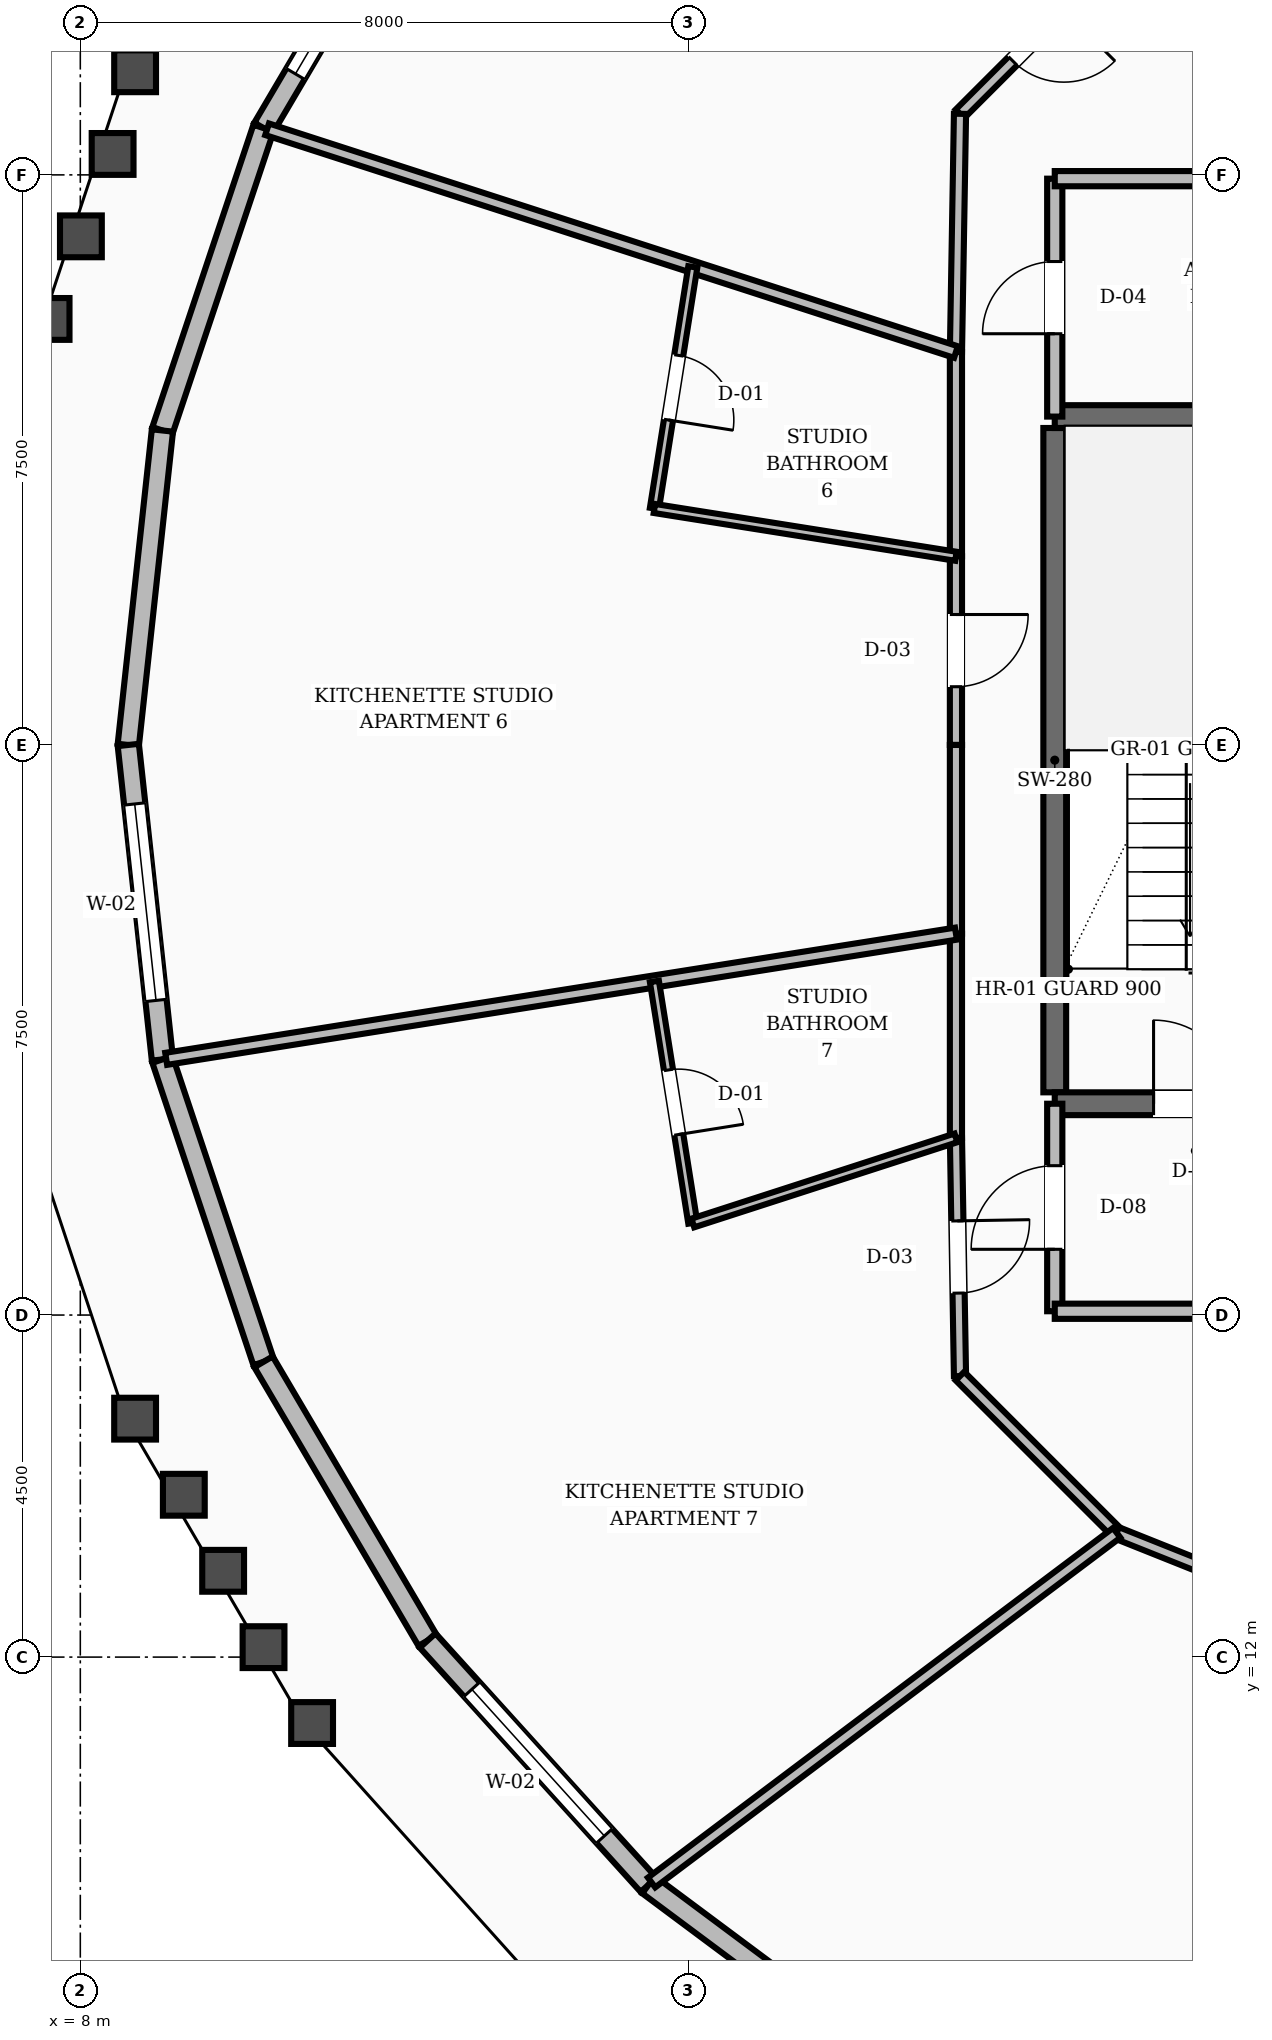
"""IFC4 building model, lengths in metres.
Left out: names, types, materials, properties, quantities, classifications, styles, units other than length and angle.
Written with IfcOpenShell. Run it as: python <this file> out.ifc"""

import sys

from ifc_helpers import new_model, si_unit, direction, frame, frame_2d, origin, place, context, subcontext, project, spatial, rectangle, extrude, element, fill, save


model = new_model("IFC4")
c1 = context("Model", 3, precision=1e-05, world=origin(), true_north=direction((0.0, 1.0)))
c2 = subcontext(c1, "Body", "Model", "MODEL_VIEW")
j1 = project(units=[si_unit("LENGTHUNIT", "METRE"), si_unit("PLANEANGLEUNIT", "RADIAN")], contexts=[c1])
p1 = place(None, origin())
s1 = spatial("IfcSite", under=j1, at=p1, CompositionType="ELEMENT")
p2 = place(p1, origin())
s2 = spatial("IfcBuilding", under=s1, at=p2, CompositionType="ELEMENT")
p3 = place(p2, frame((0.0, 0.0, 218.4)))
s3 = spatial("IfcBuildingStorey", under=s2, at=p3, CompositionType="ELEMENT", Elevation=218.4)
p4 = place(p3, frame((20.82, 19.43, 0.0), z_axis=(0.0, 0.0, 1.0), x_axis=(0.0, 1.0, 0.0)))
e1 = element("IfcWall", 1, at=p4, inside=s3, PredefinedType="SHEAR", context=c2, shape_type="SweptSolid", body=[
    extrude(rectangle(XDim=8.74, YDim=0.3, at=frame_2d((4.37, 0.0))), origin(), (0.0, 0.0, 1.0), 3.6),
])
p5 = place(p3, frame((20.82, 19.28, 0.0), z_axis=(0.0, 0.0, 1.0), x_axis=(1.0, 0.0, 0.0)))
e2 = element("IfcWall", 2, at=p5, inside=s3, PredefinedType="SHEAR", context=c2, shape_type="SweptSolid", body=[
    extrude(rectangle(XDim=3.6, YDim=0.3, at=frame_2d((1.8, 0.0))), origin(), (0.0, 0.0, 1.0), 3.6),
])
p6 = place(p5, frame((1.3, 0.0, 0.0)))
e3 = element("IfcOpeningElement", 3, at=p6, cuts=e2, PredefinedType="OPENING", context=c2, shape_type="SweptSolid", body=[
    extrude(rectangle(XDim=1.1, YDim=2.1, at=frame_2d((0.55, 1.05))), frame((0.0, 0.16, 0.0), z_axis=(0.0, -1.0, 0.0), x_axis=(1.0, 0.0, 0.0)), (0.0, 0.0, 1.0), 0.32),
])
p7 = place(p3, frame((20.82, 28.32, 0.0), z_axis=(0.0, 0.0, 1.0), x_axis=(1.0, 0.0, 0.0)))
e4 = element("IfcWall", 4, at=p7, inside=s3, PredefinedType="SHEAR", context=c2, shape_type="SweptSolid", body=[
    extrude(rectangle(XDim=3.6, YDim=0.3, at=frame_2d((1.8, 0.0))), origin(), (0.0, 0.0, 1.0), 3.6),
])
p8 = place(p3, frame((12.57, 35.782, 0.0), z_axis=(0.0, 0.0, 1.0), x_axis=(-0.50750901232, -0.861646448617, 0.0)))
e5 = element("IfcWall", 5, at=p8, inside=s3, PredefinedType="STANDARD", context=c2, shape_type="SweptSolid", body=[
    extrude(rectangle(XDim=4.255, YDim=0.28, at=frame_2d((2.127, 0.0))), origin(), (0.0, 0.0, 1.0), 2.88),
])
p9 = place(p8, frame((0.827, 0.0, 0.8)))
e6 = element("IfcOpeningElement", 6, at=p9, cuts=e5, PredefinedType="OPENING", context=c2, shape_type="SweptSolid", body=[
    extrude(rectangle(XDim=2.6, YDim=1.65, at=frame_2d((1.3, 0.825))), frame((0.0, 0.15, 0.0), z_axis=(0.0, -1.0, 0.0), x_axis=(1.0, 0.0, 0.0)), (0.0, 0.0, 1.0), 0.3),
])
p10 = place(p3, frame((10.41, 32.115, 0.0), z_axis=(0.0, 0.0, 1.0), x_axis=(-0.317030851827, -0.948415224989, 0.0)))
e7 = element("IfcWall", 7, at=p10, inside=s3, PredefinedType="STANDARD", context=c2, shape_type="SweptSolid", body=[
    extrude(rectangle(XDim=4.195, YDim=0.28, at=frame_2d((2.097, 0.0))), origin(), (0.0, 0.0, 1.0), 2.88),
])
p11 = place(p3, frame((9.08, 28.137, 0.0), z_axis=(0.0, 0.0, 1.0), x_axis=(-0.107887755605, -0.994163081285, 0.0)))
e8 = element("IfcWall", 8, at=p11, inside=s3, PredefinedType="STANDARD", context=c2, shape_type="SweptSolid", body=[
    extrude(rectangle(XDim=4.161, YDim=0.28, at=frame_2d((2.081, 0.0))), origin(), (0.0, 0.0, 1.0), 2.88),
])
p12 = place(p3, frame((8.631, 24.0, 0.0), z_axis=(0.0, 0.0, 1.0), x_axis=(0.107887755605, -0.994163081285, 0.0)))
e9 = element("IfcWall", 9, at=p12, inside=s3, PredefinedType="STANDARD", context=c2, shape_type="SweptSolid", body=[
    extrude(rectangle(XDim=4.161, YDim=0.28, at=frame_2d((2.081, 0.0))), origin(), (0.0, 0.0, 1.0), 2.88),
])
p13 = place(p12, frame((0.781, 0.0, 0.8)))
e10 = element("IfcOpeningElement", 10, at=p13, cuts=e9, PredefinedType="OPENING", context=c2, shape_type="SweptSolid", body=[
    extrude(rectangle(XDim=2.6, YDim=1.65, at=frame_2d((1.3, 0.825))), frame((0.0, 0.15, 0.0), z_axis=(0.0, -1.0, 0.0), x_axis=(1.0, 0.0, 0.0)), (0.0, 0.0, 1.0), 0.3),
])
p14 = place(p3, frame((9.08, 19.863, 0.0), z_axis=(0.0, 0.0, 1.0), x_axis=(0.317030851827, -0.948415224989, 0.0)))
e11 = element("IfcWall", 11, at=p14, inside=s3, PredefinedType="STANDARD", context=c2, shape_type="SweptSolid", body=[
    extrude(rectangle(XDim=4.195, YDim=0.28, at=frame_2d((2.097, 0.0))), origin(), (0.0, 0.0, 1.0), 2.88),
])
p15 = place(p3, frame((10.41, 15.885, 0.0), z_axis=(0.0, 0.0, 1.0), x_axis=(0.50750901232, -0.861646448617, 0.0)))
e12 = element("IfcWall", 12, at=p15, inside=s3, PredefinedType="STANDARD", context=c2, shape_type="SweptSolid", body=[
    extrude(rectangle(XDim=4.255, YDim=0.28, at=frame_2d((2.127, 0.0))), origin(), (0.0, 0.0, 1.0), 2.88),
])
p16 = place(p3, frame((12.57, 12.218, 0.0), z_axis=(0.0, 0.0, 1.0), x_axis=(0.670746586543, -0.741686602711, 0.0)))
e13 = element("IfcWall", 13, at=p16, inside=s3, PredefinedType="STANDARD", context=c2, shape_type="SweptSolid", body=[
    extrude(rectangle(XDim=4.333, YDim=0.28, at=frame_2d((2.167, 0.0))), origin(), (0.0, 0.0, 1.0), 2.88),
])
p17 = place(p16, frame((0.866, 0.0, 0.8)))
e14 = element("IfcOpeningElement", 14, at=p17, cuts=e13, PredefinedType="OPENING", context=c2, shape_type="SweptSolid", body=[
    extrude(rectangle(XDim=2.6, YDim=1.65, at=frame_2d((1.3, 0.825))), frame((0.0, 0.15, 0.0), z_axis=(0.0, -1.0, 0.0), x_axis=(1.0, 0.0, 0.0)), (0.0, 0.0, 1.0), 0.3),
])
p18 = place(p3, frame((15.476, 9.005, 0.0), z_axis=(0.0, 0.0, 1.0), x_axis=(0.802005914902, -0.597316090912, 0.0)))
e15 = element("IfcWall", 15, at=p18, inside=s3, PredefinedType="STANDARD", context=c2, shape_type="SweptSolid", body=[
    extrude(rectangle(XDim=4.416, YDim=0.28, at=frame_2d((2.208, 0.0))), origin(), (0.0, 0.0, 1.0), 2.88),
])
p19 = place(p3, frame((20.82, 16.55, 0.0), z_axis=(0.0, 0.0, 1.0), x_axis=(0.0, 1.0, 0.0)))
e16 = element("IfcWall", 16, at=p19, inside=s3, PredefinedType="SOLIDWALL", context=c2, shape_type="SweptSolid", body=[
    extrude(rectangle(XDim=2.73, YDim=0.2, at=frame_2d((1.365, 0.0))), origin(), (0.0, 0.0, 1.0), 2.87),
])
p20 = place(p19, frame((0.815, 0.0, 0.0)))
e17 = element("IfcOpeningElement", 17, at=p20, cuts=e16, PredefinedType="OPENING", context=c2, shape_type="SweptSolid", body=[
    extrude(rectangle(XDim=1.1, YDim=2.1, at=frame_2d((0.55, 1.05))), frame((0.0, 0.11, 0.0), z_axis=(0.0, -1.0, 0.0), x_axis=(1.0, 0.0, 0.0)), (0.0, 0.0, 1.0), 0.22),
])
p21 = place(p3, frame((20.82, 16.55, 0.0), z_axis=(0.0, 0.0, 1.0), x_axis=(1.0, 0.0, 0.0)))
e18 = element("IfcWall", 18, at=p21, inside=s3, PredefinedType="SOLIDWALL", context=c2, shape_type="SweptSolid", body=[
    extrude(rectangle(XDim=3.98, YDim=0.2, at=frame_2d((1.99, 0.0))), origin(), (0.0, 0.0, 1.0), 2.87),
])
p22 = place(p3, frame((20.82, 28.32, 0.0), z_axis=(0.0, 0.0, 1.0), x_axis=(0.0, 1.0, 0.0)))
e19 = element("IfcWall", 19, at=p22, inside=s3, PredefinedType="SOLIDWALL", context=c2, shape_type="SweptSolid", body=[
    extrude(rectangle(XDim=3.13, YDim=0.2, at=frame_2d((1.565, 0.0))), origin(), (0.0, 0.0, 1.0), 2.87),
])
p23 = place(p22, frame((1.09, 0.0, 0.0)))
e20 = element("IfcOpeningElement", 20, at=p23, cuts=e19, PredefinedType="OPENING", context=c2, shape_type="SweptSolid", body=[
    extrude(rectangle(XDim=0.95, YDim=2.1, at=frame_2d((0.475, 1.05))), frame((0.0, 0.11, 0.0), z_axis=(0.0, -1.0, 0.0), x_axis=(1.0, 0.0, 0.0)), (0.0, 0.0, 1.0), 0.22),
])
p24 = place(p3, frame((20.82, 31.45, 0.0), z_axis=(0.0, 0.0, 1.0), x_axis=(1.0, 0.0, 0.0)))
e21 = element("IfcWall", 21, at=p24, inside=s3, PredefinedType="SOLIDWALL", context=c2, shape_type="SweptSolid", body=[
    extrude(rectangle(XDim=3.98, YDim=0.2, at=frame_2d((1.99, 0.0))), origin(), (0.0, 0.0, 1.0), 2.87),
])
p25 = place(p3, frame((21.635, 34.365, 0.0), z_axis=(0.0, 0.0, 1.0), x_axis=(-0.707106781187, -0.707106781187, 0.0)))
e22 = element("IfcWall", 22, at=p25, inside=s3, PredefinedType="SOLIDWALL", context=c2, shape_type="SweptSolid", body=[
    extrude(rectangle(XDim=2.916, YDim=0.16, at=frame_2d((1.458, 0.0))), origin(), (0.0, 0.0, 1.0), 2.87),
])
p26 = place(p25, frame((0.983, 0.0, 0.0)))
e23 = element("IfcOpeningElement", 23, at=p26, cuts=e22, PredefinedType="OPENING", context=c2, shape_type="SweptSolid", body=[
    extrude(rectangle(XDim=0.95, YDim=2.1, at=frame_2d((0.475, 1.05))), frame((0.0, 0.09, 0.0), z_axis=(0.0, -1.0, 0.0), x_axis=(1.0, 0.0, 0.0)), (0.0, 0.0, 1.0), 0.18),
])
p27 = place(p3, frame((19.573, 32.303, 0.0), z_axis=(0.0, 0.0, 1.0), x_axis=(-0.016981035134, -0.999855811828, 0.0)))
e24 = element("IfcWall", 24, at=p27, inside=s3, PredefinedType="SOLIDWALL", context=c2, shape_type="SweptSolid", body=[
    extrude(rectangle(XDim=3.134, YDim=0.16, at=frame_2d((1.567, 0.0))), origin(), (0.0, 0.0, 1.0), 2.87),
])
p28 = place(p3, frame((19.52, 29.169, 0.0), z_axis=(0.0, 0.0, 1.0), x_axis=(0.0, -1.0, 0.0)))
e25 = element("IfcWall", 25, at=p28, inside=s3, PredefinedType="SOLIDWALL", context=c2, shape_type="SweptSolid", body=[
    extrude(rectangle(XDim=2.687, YDim=0.16, at=frame_2d((1.344, 0.0))), origin(), (0.0, 0.0, 1.0), 2.87),
])
p29 = place(p3, frame((19.52, 26.482, 0.0), z_axis=(0.0, 0.0, 1.0), x_axis=(0.0, -1.0, 0.0)))
e26 = element("IfcWall", 26, at=p29, inside=s3, PredefinedType="SOLIDWALL", context=c2, shape_type="SweptSolid", body=[
    extrude(rectangle(XDim=2.482, YDim=0.16, at=frame_2d((1.241, 0.0))), origin(), (0.0, 0.0, 1.0), 2.87),
])
p30 = place(p29, frame((0.766, 0.0, 0.0)))
e27 = element("IfcOpeningElement", 27, at=p30, cuts=e26, PredefinedType="OPENING", context=c2, shape_type="SweptSolid", body=[
    extrude(rectangle(XDim=0.95, YDim=2.1, at=frame_2d((0.475, 1.05))), frame((0.0, 0.09, 0.0), z_axis=(0.0, -1.0, 0.0), x_axis=(1.0, 0.0, 0.0)), (0.0, 0.0, 1.0), 0.18),
])
p31 = place(p3, frame((19.52, 24.0, 0.0), z_axis=(0.0, 0.0, 1.0), x_axis=(0.0, -1.0, 0.0)))
e28 = element("IfcWall", 28, at=p31, inside=s3, PredefinedType="SOLIDWALL", context=c2, shape_type="SweptSolid", body=[
    extrude(rectangle(XDim=2.482, YDim=0.16, at=frame_2d((1.241, 0.0))), origin(), (0.0, 0.0, 1.0), 2.87),
])
p32 = place(p3, frame((19.52, 21.518, 0.0), z_axis=(0.0, 0.0, 1.0), x_axis=(0.0, -1.0, 0.0)))
e29 = element("IfcWall", 29, at=p32, inside=s3, PredefinedType="SOLIDWALL", context=c2, shape_type="SweptSolid", body=[
    extrude(rectangle(XDim=2.687, YDim=0.16, at=frame_2d((1.344, 0.0))), origin(), (0.0, 0.0, 1.0), 2.87),
])
p33 = place(p3, frame((19.52, 18.831, 0.0), z_axis=(0.0, 0.0, 1.0), x_axis=(0.016981035134, -0.999855811828, 0.0)))
e30 = element("IfcWall", 30, at=p33, inside=s3, PredefinedType="SOLIDWALL", context=c2, shape_type="SweptSolid", body=[
    extrude(rectangle(XDim=3.134, YDim=0.16, at=frame_2d((1.567, 0.0))), origin(), (0.0, 0.0, 1.0), 2.87),
])
p34 = place(p33, frame((1.092, 0.0, 0.0)))
e31 = element("IfcOpeningElement", 31, at=p34, cuts=e30, PredefinedType="OPENING", context=c2, shape_type="SweptSolid", body=[
    extrude(rectangle(XDim=0.95, YDim=2.1, at=frame_2d((0.475, 1.05))), frame((0.0, 0.09, 0.0), z_axis=(0.0, -1.0, 0.0), x_axis=(1.0, 0.0, 0.0)), (0.0, 0.0, 1.0), 0.18),
])
p35 = place(p3, frame((19.573, 15.697, 0.0), z_axis=(0.0, 0.0, 1.0), x_axis=(0.707106781187, -0.707106781187, 0.0)))
e32 = element("IfcWall", 32, at=p35, inside=s3, PredefinedType="SOLIDWALL", context=c2, shape_type="SweptSolid", body=[
    extrude(rectangle(XDim=2.916, YDim=0.16, at=frame_2d((1.458, 0.0))), origin(), (0.0, 0.0, 1.0), 2.87),
])
p36 = place(p3, frame((21.635, 13.635, 0.0), z_axis=(0.0, 0.0, 1.0), x_axis=(0.92856882165, -0.371160266542, 0.0)))
e33 = element("IfcWall", 33, at=p36, inside=s3, PredefinedType="SOLIDWALL", context=c2, shape_type="SweptSolid", body=[
    extrude(rectangle(XDim=2.923, YDim=0.16, at=frame_2d((1.461, 0.0))), origin(), (0.0, 0.0, 1.0), 2.87),
])
p37 = place(p3, frame((19.52, 29.169, 0.0), z_axis=(0.0, 0.0, 1.0), x_axis=(-0.951482710275, 0.307702213264, 0.0)))
e34 = element("IfcWall", 34, at=p37, inside=s3, PredefinedType="SOLIDWALL", context=c2, shape_type="SweptSolid", body=[
    extrude(rectangle(XDim=9.524, YDim=0.16, at=frame_2d((4.762, 0.0))), origin(), (0.0, 0.0, 1.0), 2.87),
])
p38 = place(p3, frame((16.058, 30.289, 0.0), z_axis=(0.0, 0.0, 1.0), x_axis=(-0.156987224251, -0.987600633567, 0.0)))
e35 = element("IfcWall", 35, at=p38, inside=s3, PredefinedType="PARTITIONING", context=c2, shape_type="SweptSolid", body=[
    extrude(rectangle(XDim=3.218, YDim=0.12, at=frame_2d((1.609, 0.0))), origin(), (0.0, 0.0, 1.0), 2.87),
])
p39 = place(p38, frame((1.179, 0.0, 0.0)))
e36 = element("IfcOpeningElement", 36, at=p39, cuts=e35, PredefinedType="OPENING", context=c2, shape_type="SweptSolid", body=[
    extrude(rectangle(XDim=0.86, YDim=2.1, at=frame_2d((0.43, 1.05))), frame((0.0, 0.07, 0.0), z_axis=(0.0, -1.0, 0.0), x_axis=(1.0, 0.0, 0.0)), (0.0, 0.0, 1.0), 0.14),
])
p40 = place(p3, frame((19.52, 26.482, 0.0), z_axis=(0.0, 0.0, 1.0), x_axis=(-0.987675083343, 0.156518145093, 0.0)))
e37 = element("IfcWall", 37, at=p40, inside=s3, PredefinedType="PARTITIONING", context=c2, shape_type="SweptSolid", body=[
    extrude(rectangle(XDim=4.017, YDim=0.12, at=frame_2d((2.008, 0.0))), origin(), (0.0, 0.0, 1.0), 2.87),
])
p41 = place(p3, frame((19.52, 21.518, 0.0), z_axis=(0.0, 0.0, 1.0), x_axis=(-0.987669269577, -0.156554827241, 0.0)))
e38 = element("IfcWall", 38, at=p41, inside=s3, PredefinedType="SOLIDWALL", context=c2, shape_type="SweptSolid", body=[
    extrude(rectangle(XDim=10.52, YDim=0.16, at=frame_2d((5.26, 0.0))), origin(), (0.0, 0.0, 1.0), 2.87),
])
p42 = place(p3, frame((15.553, 20.889, 0.0), z_axis=(0.0, 0.0, 1.0), x_axis=(0.156987224251, -0.987600633567, 0.0)))
e39 = element("IfcWall", 39, at=p42, inside=s3, PredefinedType="PARTITIONING", context=c2, shape_type="SweptSolid", body=[
    extrude(rectangle(XDim=3.218, YDim=0.12, at=frame_2d((1.609, 0.0))), origin(), (0.0, 0.0, 1.0), 2.87),
])
p43 = place(p42, frame((1.179, 0.0, 0.0)))
e40 = element("IfcOpeningElement", 40, at=p43, cuts=e39, PredefinedType="OPENING", context=c2, shape_type="SweptSolid", body=[
    extrude(rectangle(XDim=0.86, YDim=2.1, at=frame_2d((0.43, 1.05))), frame((0.0, 0.07, 0.0), z_axis=(0.0, -1.0, 0.0), x_axis=(1.0, 0.0, 0.0)), (0.0, 0.0, 1.0), 0.14),
])
p44 = place(p3, frame((19.52, 18.831, 0.0), z_axis=(0.0, 0.0, 1.0), x_axis=(-0.951496525558, -0.307659490105, 0.0)))
e41 = element("IfcWall", 41, at=p44, inside=s3, PredefinedType="PARTITIONING", context=c2, shape_type="SweptSolid", body=[
    extrude(rectangle(XDim=3.638, YDim=0.12, at=frame_2d((1.819, 0.0))), origin(), (0.0, 0.0, 1.0), 2.87),
])
p45 = place(p3, frame((21.635, 13.635, 0.0), z_axis=(0.0, 0.0, 1.0), x_axis=(-0.799310631822, -0.600918059186, 0.0)))
e42 = element("IfcWall", 42, at=p45, inside=s3, PredefinedType="SOLIDWALL", context=c2, shape_type="SweptSolid", body=[
    extrude(rectangle(XDim=7.656, YDim=0.16, at=frame_2d((3.828, 0.0))), origin(), (0.0, 0.0, 1.0), 2.87),
])
p46 = place(p9, origin())
e43 = element("IfcWindow", 43, at=p46, inside=s3, PartitioningType="SINGLE_PANEL", PredefinedType="WINDOW", context=c2, shape_type="SweptSolid", body=[
    extrude(rectangle(XDim=2.6, YDim=1.65, at=frame_2d((1.3, 0.825))), frame((0.0, 0.03, 0.0), z_axis=(0.0, -1.0, 0.0), x_axis=(1.0, 0.0, 0.0)), (0.0, 0.0, 1.0), 0.06),
])
fill(e6, e43)
p47 = place(p13, origin())
e44 = element("IfcWindow", 44, at=p47, inside=s3, PartitioningType="SINGLE_PANEL", PredefinedType="WINDOW", context=c2, shape_type="SweptSolid", body=[
    extrude(rectangle(XDim=2.6, YDim=1.65, at=frame_2d((1.3, 0.825))), frame((0.0, 0.03, 0.0), z_axis=(0.0, -1.0, 0.0), x_axis=(1.0, 0.0, 0.0)), (0.0, 0.0, 1.0), 0.06),
])
fill(e10, e44)
p48 = place(p17, origin())
e45 = element("IfcWindow", 45, at=p48, inside=s3, PartitioningType="SINGLE_PANEL", PredefinedType="WINDOW", context=c2, shape_type="SweptSolid", body=[
    extrude(rectangle(XDim=2.6, YDim=1.65, at=frame_2d((1.3, 0.825))), frame((0.0, 0.03, 0.0), z_axis=(0.0, -1.0, 0.0), x_axis=(1.0, 0.0, 0.0)), (0.0, 0.0, 1.0), 0.06),
])
fill(e14, e45)
p49 = place(p6, origin())
e46 = element("IfcDoor", 46, at=p49, inside=s3, OperationType="SINGLE_SWING_LEFT", PredefinedType="DOOR", context=c2, shape_type="SweptSolid", body=[
    extrude(rectangle(XDim=1.1, YDim=2.1, at=frame_2d((0.55, 1.05))), frame((0.0, 0.025, 0.0), z_axis=(0.0, -1.0, 0.0), x_axis=(1.0, 0.0, 0.0)), (0.0, 0.0, 1.0), 0.05),
])
fill(e3, e46)
p50 = place(p20, origin())
e47 = element("IfcDoor", 47, at=p50, inside=s3, OperationType="SINGLE_SWING_LEFT", PredefinedType="DOOR", context=c2, shape_type="SweptSolid", body=[
    extrude(rectangle(XDim=1.1, YDim=2.1, at=frame_2d((0.55, 1.05))), frame((0.0, 0.025, 0.0), z_axis=(0.0, -1.0, 0.0), x_axis=(1.0, 0.0, 0.0)), (0.0, 0.0, 1.0), 0.05),
])
fill(e17, e47)
p51 = place(p23, origin())
e48 = element("IfcDoor", 48, at=p51, inside=s3, OperationType="SINGLE_SWING_LEFT", PredefinedType="DOOR", context=c2, shape_type="SweptSolid", body=[
    extrude(rectangle(XDim=0.95, YDim=2.1, at=frame_2d((0.475, 1.05))), frame((0.0, 0.025, 0.0), z_axis=(0.0, -1.0, 0.0), x_axis=(1.0, 0.0, 0.0)), (0.0, 0.0, 1.0), 0.05),
])
fill(e20, e48)
p52 = place(p26, origin())
e49 = element("IfcDoor", 49, at=p52, inside=s3, OperationType="SINGLE_SWING_LEFT", PredefinedType="DOOR", context=c2, shape_type="SweptSolid", body=[
    extrude(rectangle(XDim=0.95, YDim=2.1, at=frame_2d((0.475, 1.05))), frame((0.0, 0.025, 0.0), z_axis=(0.0, -1.0, 0.0), x_axis=(1.0, 0.0, 0.0)), (0.0, 0.0, 1.0), 0.05),
])
fill(e23, e49)
p53 = place(p39, origin())
e50 = element("IfcDoor", 50, at=p53, inside=s3, OperationType="SINGLE_SWING_RIGHT", PredefinedType="DOOR", context=c2, shape_type="SweptSolid", body=[
    extrude(rectangle(XDim=0.86, YDim=2.1, at=frame_2d((0.43, 1.05))), frame((0.0, 0.025, 0.0), z_axis=(0.0, -1.0, 0.0), x_axis=(1.0, 0.0, 0.0)), (0.0, 0.0, 1.0), 0.05),
])
fill(e36, e50)
p54 = place(p30, origin())
e51 = element("IfcDoor", 51, at=p54, inside=s3, OperationType="SINGLE_SWING_LEFT", PredefinedType="DOOR", context=c2, shape_type="SweptSolid", body=[
    extrude(rectangle(XDim=0.95, YDim=2.1, at=frame_2d((0.475, 1.05))), frame((0.0, 0.025, 0.0), z_axis=(0.0, -1.0, 0.0), x_axis=(1.0, 0.0, 0.0)), (0.0, 0.0, 1.0), 0.05),
])
fill(e27, e51)
p55 = place(p43, origin())
e52 = element("IfcDoor", 52, at=p55, inside=s3, OperationType="SINGLE_SWING_RIGHT", PredefinedType="DOOR", context=c2, shape_type="SweptSolid", body=[
    extrude(rectangle(XDim=0.86, YDim=2.1, at=frame_2d((0.43, 1.05))), frame((0.0, 0.025, 0.0), z_axis=(0.0, -1.0, 0.0), x_axis=(1.0, 0.0, 0.0)), (0.0, 0.0, 1.0), 0.05),
])
fill(e40, e52)
p56 = place(p34, origin())
e53 = element("IfcDoor", 53, at=p56, inside=s3, OperationType="SINGLE_SWING_LEFT", PredefinedType="DOOR", context=c2, shape_type="SweptSolid", body=[
    extrude(rectangle(XDim=0.95, YDim=2.1, at=frame_2d((0.475, 1.05))), frame((0.0, 0.025, 0.0), z_axis=(0.0, -1.0, 0.0), x_axis=(1.0, 0.0, 0.0)), (0.0, 0.0, 1.0), 0.05),
])
fill(e31, e53)
save(model, sys.argv[1])
